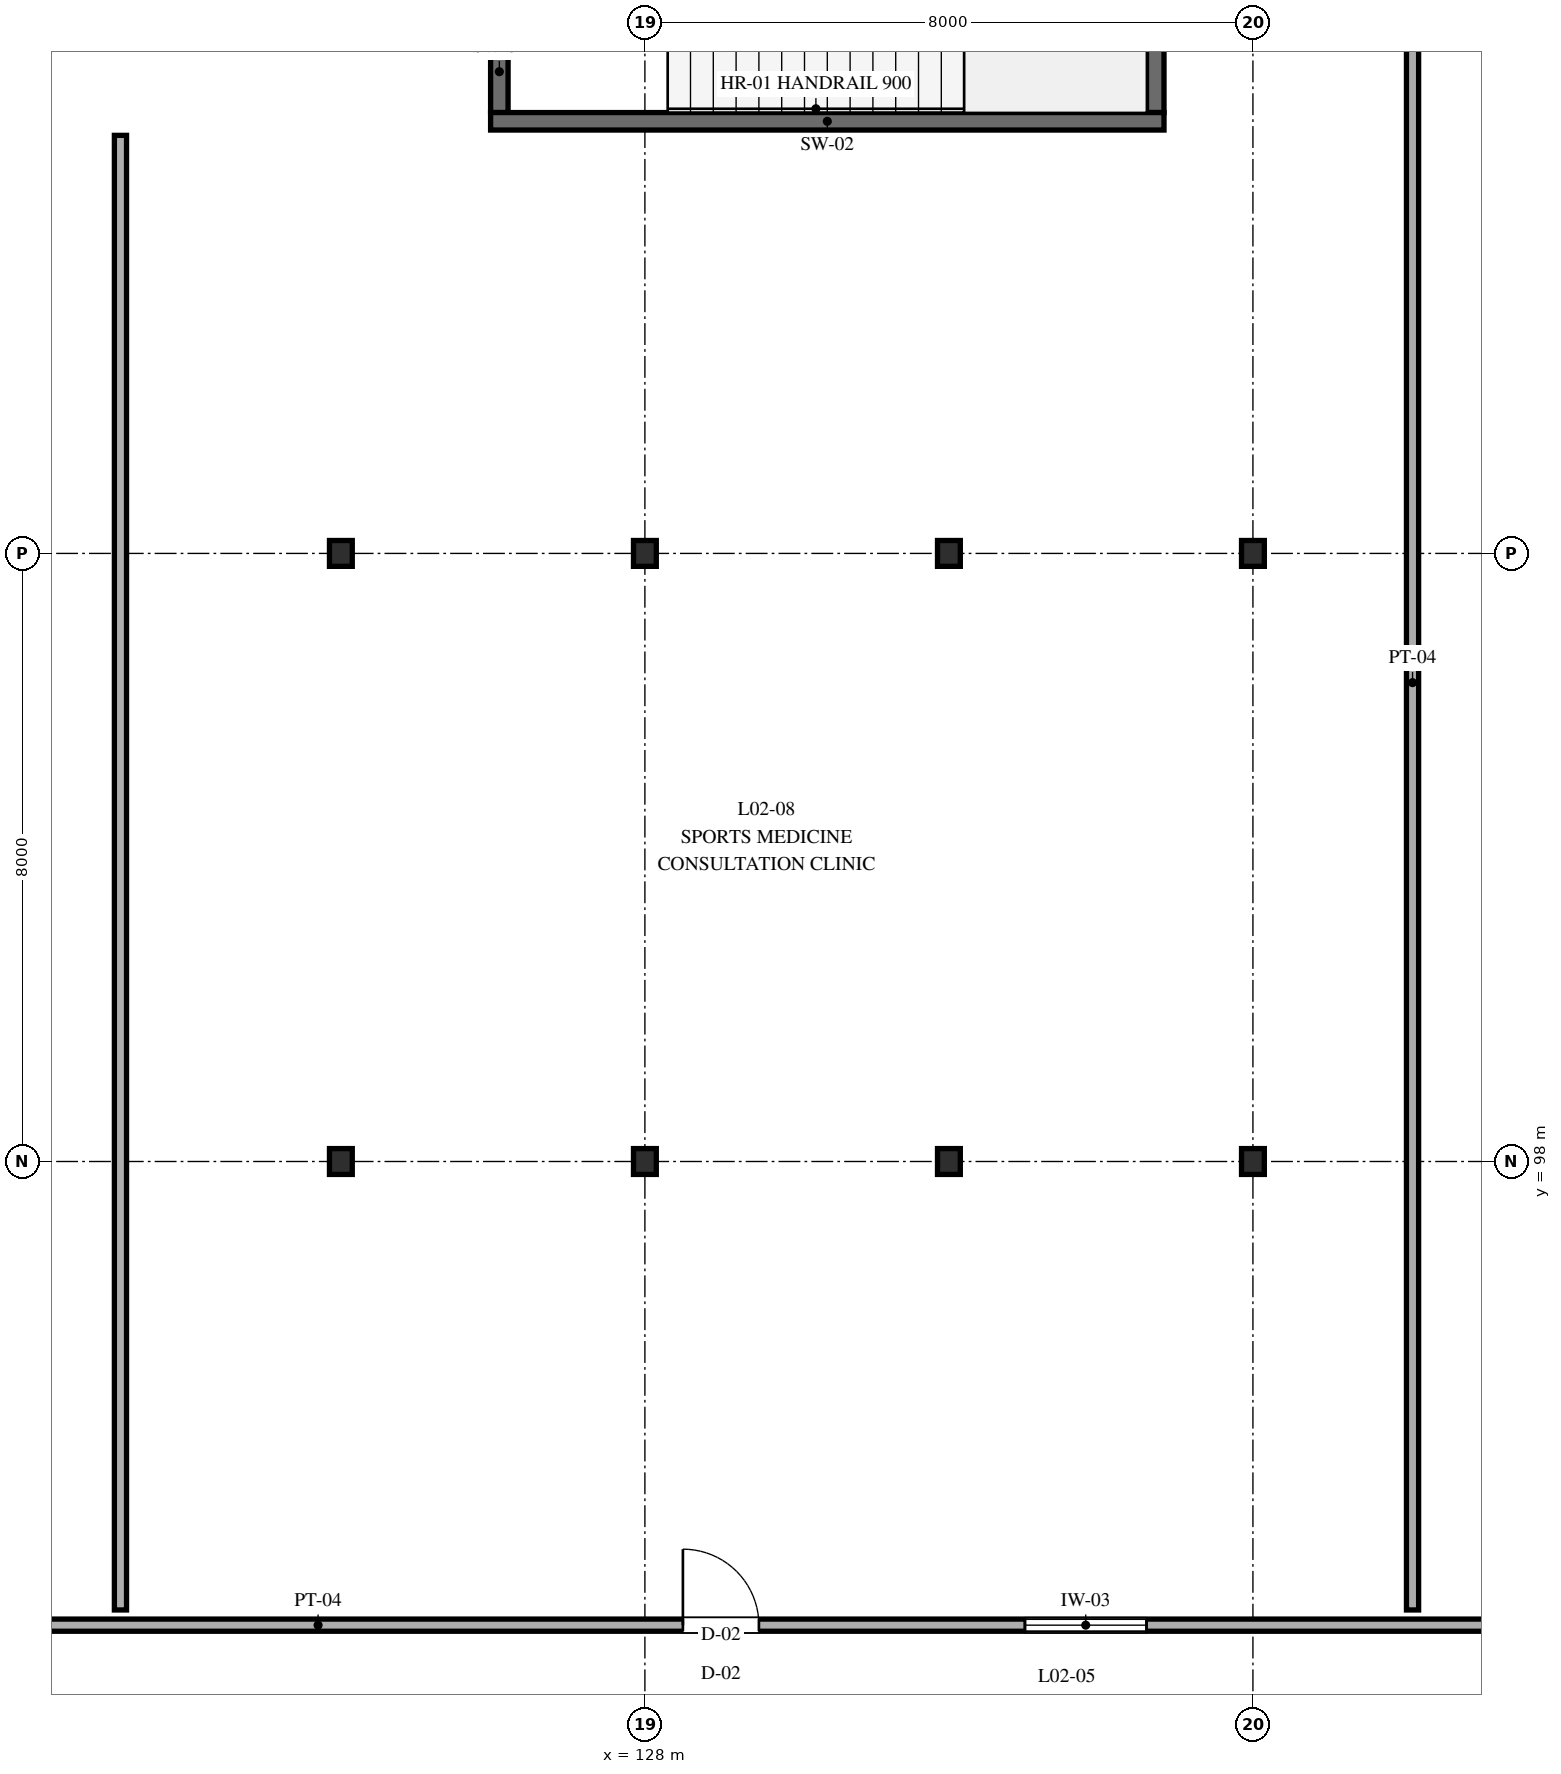
"""IFC4 building model, lengths in metres.
Left out: names, types, materials, properties, quantities, classifications, styles, units other than length and angle.
Written with IfcOpenShell. Run it as: python <this file> out.ifc"""

import sys

from ifc_helpers import new_model, si_unit, direction, frame, frame_2d, origin, origin_2d, place, context, subcontext, project, spatial, rectangle, i_section, extrude, element, fill, save


model = new_model("IFC4")
c1 = context("Model", 3, precision=1e-05, world=origin(), true_north=direction((0.0, 1.0)))
c2 = subcontext(c1, "Body", "Model", "MODEL_VIEW")
j1 = project(units=[si_unit("LENGTHUNIT", "METRE"), si_unit("PLANEANGLEUNIT", "RADIAN")], contexts=[c1])
p1 = place(None, origin())
s1 = spatial("IfcSite", under=j1, at=p1, CompositionType="ELEMENT")
p2 = place(p1, origin())
s2 = spatial("IfcBuilding", under=s1, at=p2, CompositionType="ELEMENT")
p3 = place(p2, frame((0.0, 0.0, 9.6)))
s3 = spatial("IfcBuildingStorey", under=s2, at=p3, CompositionType="ELEMENT", Elevation=9.6)
for number, where, z_axis, x_axis in (
    (1, (124.0, 98.0, 0.0), (0.0, 0.0, 1.0), (1.0, 0.0, 0.0)),
    (2, (124.0, 106.0, 0.0), (0.0, 0.0, 1.0), (1.0, 0.0, 0.0)),
    (3, (128.0, 98.0, 0.0), (0.0, 0.0, 1.0), (1.0, 0.0, 0.0)),
    (4, (128.0, 106.0, 0.0), (0.0, 0.0, 1.0), (1.0, 0.0, 0.0)),
    (5, (132.0, 98.0, 0.0), (0.0, 0.0, 1.0), (1.0, 0.0, 0.0)),
    (6, (132.0, 106.0, 0.0), (0.0, 0.0, 1.0), (1.0, 0.0, 0.0)),
    (7, (136.0, 98.0, 0.0), (0.0, 0.0, 1.0), (1.0, 0.0, 0.0)),
    (8, (136.0, 106.0, 0.0), (0.0, 0.0, 1.0), (1.0, 0.0, 0.0)),
):
    element("IfcColumn", number, at=place(p3, frame(where, z_axis=z_axis, x_axis=x_axis)), inside=s3, PredefinedType="COLUMN", context=c2, shape_type="SweptSolid", body=[
        extrude(i_section(OverallWidth=0.3, OverallDepth=0.34, WebThickness=0.012, FlangeThickness=0.021, FilletRadius=0.027, at=origin_2d()), origin(), (0.0, 0.0, 1.0), 4.4),
    ])
p4 = place(p3, frame((126.085, 111.8, 0.0), z_axis=(0.0, 0.0, 1.0), x_axis=(0.0, 1.0, 0.0)))
e9 = element("IfcWall", 9, at=p4, inside=s3, PredefinedType="SHEAR", context=c2, shape_type="SweptSolid", body=[
    extrude(rectangle(XDim=4.3, YDim=0.23, at=frame_2d((2.15, 0.0))), origin(), (0.0, 0.0, 1.0), 4.4),
])
p5 = place(p4, frame((1.425, 0.0, 0.0)))
e10 = element("IfcOpeningElement", 10, at=p5, cuts=e9, PredefinedType="OPENING", context=c2, shape_type="SweptSolid", body=[
    extrude(rectangle(XDim=1.45, YDim=2.2, at=frame_2d((0.725, 1.1))), frame((0.0, 0.125, 0.0), z_axis=(0.0, -1.0, 0.0), x_axis=(1.0, 0.0, 0.0)), (0.0, 0.0, 1.0), 0.25),
])
p6 = place(p3, frame((134.715, 116.1, 0.0), z_axis=(0.0, 0.0, 1.0), x_axis=(0.0, -1.0, 0.0)))
e11 = element("IfcWall", 11, at=p6, inside=s3, PredefinedType="SHEAR", context=c2, shape_type="SweptSolid", body=[
    extrude(rectangle(XDim=4.3, YDim=0.23, at=frame_2d((2.15, 0.0))), origin(), (0.0, 0.0, 1.0), 4.4),
])
p7 = place(p3, frame((125.97, 111.685, 0.0), z_axis=(0.0, 0.0, 1.0), x_axis=(1.0, 0.0, 0.0)))
e12 = element("IfcWall", 12, at=p7, inside=s3, PredefinedType="SHEAR", context=c2, shape_type="SweptSolid", body=[
    extrude(rectangle(XDim=8.86, YDim=0.23, at=frame_2d((4.43, 0.0))), origin(), (0.0, 0.0, 1.0), 4.4),
])
p8 = place(p3, frame((104.5, 91.9, 0.0), z_axis=(0.0, 0.0, 1.0), x_axis=(1.0, 0.0, 0.0)))
e13 = element("IfcWall", 13, at=p8, inside=s3, PredefinedType="PARTITIONING", context=c2, shape_type="SweptSolid", body=[
    extrude(rectangle(XDim=47.0, YDim=0.16, at=frame_2d((23.5, 0.0))), origin(), (0.0, 0.0, 1.0), 3.7),
])
p9 = place(p8, frame((2.5, 0.0, 0.0)))
e14 = element("IfcOpeningElement", 14, at=p9, cuts=e13, PredefinedType="OPENING", context=c2, shape_type="SweptSolid", body=[
    extrude(rectangle(XDim=1.1, YDim=2.2, at=frame_2d((0.55, 1.1))), frame((0.0, 0.09, 0.0), z_axis=(0.0, -1.0, 0.0), x_axis=(1.0, 0.0, 0.0)), (0.0, 0.0, 1.0), 0.18),
])
p10 = place(p8, frame((9.5, 0.0, 0.0)))
e15 = element("IfcOpeningElement", 15, at=p10, cuts=e13, PredefinedType="OPENING", context=c2, shape_type="SweptSolid", body=[
    extrude(rectangle(XDim=1.05, YDim=2.15, at=frame_2d((0.525, 1.075))), frame((0.0, 0.09, 0.0), z_axis=(0.0, -1.0, 0.0), x_axis=(1.0, 0.0, 0.0)), (0.0, 0.0, 1.0), 0.18),
])
p11 = place(p8, frame((12.8, 0.0, 0.0)))
e16 = element("IfcOpeningElement", 16, at=p11, cuts=e13, PredefinedType="OPENING", context=c2, shape_type="SweptSolid", body=[
    extrude(rectangle(XDim=1.6, YDim=2.2, at=frame_2d((0.8, 1.1))), frame((0.0, 0.09, 0.0), z_axis=(0.0, -1.0, 0.0), x_axis=(1.0, 0.0, 0.0)), (0.0, 0.0, 1.0), 0.18),
])
p12 = place(p8, frame((24.0, 0.0, 0.0)))
e17 = element("IfcOpeningElement", 17, at=p12, cuts=e13, PredefinedType="OPENING", context=c2, shape_type="SweptSolid", body=[
    extrude(rectangle(XDim=1.0, YDim=2.15, at=frame_2d((0.5, 1.075))), frame((0.0, 0.09, 0.0), z_axis=(0.0, -1.0, 0.0), x_axis=(1.0, 0.0, 0.0)), (0.0, 0.0, 1.0), 0.18),
])
p13 = place(p8, frame((36.5, 0.0, 0.0)))
e18 = element("IfcOpeningElement", 18, at=p13, cuts=e13, PredefinedType="OPENING", context=c2, shape_type="SweptSolid", body=[
    extrude(rectangle(XDim=1.0, YDim=2.15, at=frame_2d((0.5, 1.075))), frame((0.0, 0.09, 0.0), z_axis=(0.0, -1.0, 0.0), x_axis=(1.0, 0.0, 0.0)), (0.0, 0.0, 1.0), 0.18),
])
p14 = place(p8, frame((43.0, 0.0, 0.0)))
e19 = element("IfcOpeningElement", 19, at=p14, cuts=e13, PredefinedType="OPENING", context=c2, shape_type="SweptSolid", body=[
    extrude(rectangle(XDim=1.0, YDim=2.15, at=frame_2d((0.5, 1.075))), frame((0.0, 0.09, 0.0), z_axis=(0.0, -1.0, 0.0), x_axis=(1.0, 0.0, 0.0)), (0.0, 0.0, 1.0), 0.18),
])
p15 = place(p8, frame((28.5, 0.0, 1.1)))
e20 = element("IfcOpeningElement", 20, at=p15, cuts=e13, PredefinedType="OPENING", context=c2, shape_type="SweptSolid", body=[
    extrude(rectangle(XDim=1.6, YDim=1.35, at=frame_2d((0.8, 0.675))), frame((0.0, 0.09, 0.0), z_axis=(0.0, -1.0, 0.0), x_axis=(1.0, 0.0, 0.0)), (0.0, 0.0, 1.0), 0.18),
])
p16 = place(p3, frame((121.1, 92.1, 0.0), z_axis=(0.0, 0.0, 1.0), x_axis=(0.0, 1.0, 0.0)))
e21 = element("IfcWall", 21, at=p16, inside=s3, PredefinedType="PARTITIONING", context=c2, shape_type="SweptSolid", body=[
    extrude(rectangle(XDim=19.4, YDim=0.16, at=frame_2d((9.7, 0.0))), origin(), (0.0, 0.0, 1.0), 3.7),
])
p17 = place(p3, frame((138.1, 92.1, 0.0), z_axis=(0.0, 0.0, 1.0), x_axis=(0.0, 1.0, 0.0)))
e22 = element("IfcWall", 22, at=p17, inside=s3, PredefinedType="PARTITIONING", context=c2, shape_type="SweptSolid", body=[
    extrude(rectangle(XDim=24.4, YDim=0.16, at=frame_2d((12.2, 0.0))), origin(), (0.0, 0.0, 1.0), 3.7),
])
p18 = place(p12, origin())
e23 = element("IfcDoor", 23, at=p18, inside=s3, OperationType="SINGLE_SWING_LEFT", PredefinedType="DOOR", context=c2, shape_type="SweptSolid", body=[
    extrude(rectangle(XDim=1.0, YDim=2.15, at=frame_2d((0.5, 1.075))), frame((0.0, 0.025, 0.0), z_axis=(0.0, -1.0, 0.0), x_axis=(1.0, 0.0, 0.0)), (0.0, 0.0, 1.0), 0.05),
])
fill(e17, e23)
p19 = place(p15, origin())
e24 = element("IfcWindow", 24, at=p19, inside=s3, PartitioningType="SINGLE_PANEL", PredefinedType="WINDOW", context=c2, shape_type="SweptSolid", body=[
    extrude(rectangle(XDim=1.6, YDim=1.35, at=frame_2d((0.8, 0.675))), frame((0.0, 0.03, 0.0), z_axis=(0.0, -1.0, 0.0), x_axis=(1.0, 0.0, 0.0)), (0.0, 0.0, 1.0), 0.06),
])
fill(e20, e24)
save(model, sys.argv[1])
